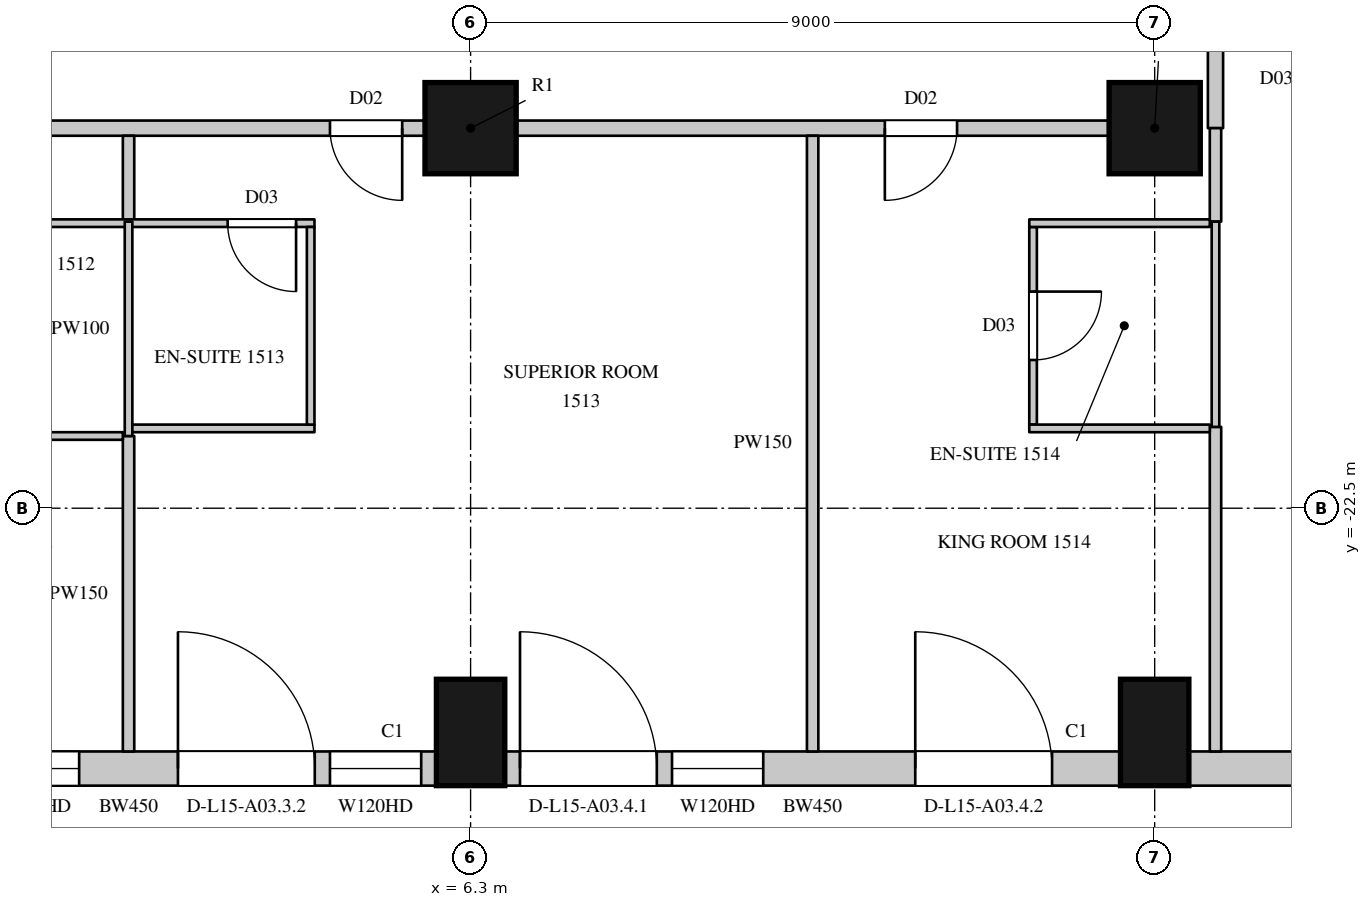
"""IFC4 building model, lengths in metres.
Left out: names, types, materials, properties, quantities, classifications, styles, units other than length and angle.
Written with IfcOpenShell. Run it as: python <this file> out.ifc"""

import sys

from ifc_helpers import new_model, si_unit, direction, frame, frame_2d, origin, origin_2d, place, context, subcontext, project, spatial, rectangle, circle, extrude, element, fill, save


model = new_model("IFC4")
c1 = context("Model", 3, precision=1e-05, world=origin(), true_north=direction((0.0, 1.0)))
c2 = subcontext(c1, "Body", "Model", "MODEL_VIEW")
j1 = project(units=[si_unit("LENGTHUNIT", "METRE"), si_unit("PLANEANGLEUNIT", "RADIAN")], contexts=[c1])
p1 = place(None, origin())
s1 = spatial("IfcSite", under=j1, at=p1, CompositionType="ELEMENT")
p2 = place(p1, origin())
s2 = spatial("IfcBuilding", under=s1, at=p2, CompositionType="ELEMENT")
p3 = place(p2, frame((0.0, 0.0, 84.3)))
s3 = spatial("IfcBuildingStorey", under=s2, at=p3, CompositionType="ELEMENT", Elevation=84.3)
for number, where, z_axis, x_axis in (
    (1, (6.3, -25.45, 0.0), (0.0, 0.0, 1.0), (1.0, 0.0, 0.0)),
    (2, (15.3, -25.45, 0.0), (0.0, 0.0, 1.0), (1.0, 0.0, 0.0)),
):
    element("IfcColumn", number, at=place(p3, frame(where, z_axis=z_axis, x_axis=x_axis)), inside=s3, PredefinedType="COLUMN", context=c2, shape_type="SweptSolid", body=[
        extrude(rectangle(XDim=0.9, YDim=1.4, at=origin_2d()), origin(), (0.0, 0.0, 1.0), 3.6),
    ])
for number, where, z_axis, x_axis in (
    (3, (6.3, -17.5, 0.0), (0.0, 0.0, 1.0), (1.0, 0.0, 0.0)),
    (4, (15.3, -17.5, 0.0), (0.0, 0.0, 1.0), (1.0, 0.0, 0.0)),
):
    element("IfcColumn", number, at=place(p3, frame(where, z_axis=z_axis, x_axis=x_axis)), inside=s3, PredefinedType="COLUMN", context=c2, shape_type="SweptSolid", body=[
        extrude(circle(Radius=0.6, at=origin_2d()), origin(), (0.0, 0.0, 1.0), 3.6),
    ])
p4 = place(p3, frame((-2.25, -25.925, 0.0), z_axis=(0.0, 0.0, 1.0), x_axis=(1.0, 0.0, 0.0)))
e5 = element("IfcWall", 5, at=p4, inside=s3, PredefinedType="SOLIDWALL", context=c2, shape_type="SweptSolid", body=[
    extrude(rectangle(XDim=8.1, YDim=0.45, at=frame_2d((4.05, 0.0))), origin(), (0.0, 0.0, 1.0), 3.3),
])
p5 = place(p4, frame((0.2, 0.0, 0.0)))
e6 = element("IfcOpeningElement", 6, at=p5, cuts=e5, PredefinedType="OPENING", context=c2, shape_type="SweptSolid", body=[
    extrude(rectangle(XDim=1.8, YDim=2.4, at=frame_2d((0.9, 1.2))), frame((0.0, 0.235, 0.0), z_axis=(0.0, -1.0, 0.0), x_axis=(1.0, 0.0, 0.0)), (0.0, 0.0, 1.0), 0.47),
])
p6 = place(p4, frame((2.2, 0.0, 1.05)))
e7 = element("IfcOpeningElement", 7, at=p6, cuts=e5, PredefinedType="OPENING", context=c2, shape_type="SweptSolid", body=[
    extrude(rectangle(XDim=1.2, YDim=2.0, at=frame_2d((0.6, 1.0))), frame((0.0, 0.235, 0.0), z_axis=(0.0, -1.0, 0.0), x_axis=(1.0, 0.0, 0.0)), (0.0, 0.0, 1.0), 0.47),
])
p7 = place(p4, frame((4.7, 0.0, 0.0)))
e8 = element("IfcOpeningElement", 8, at=p7, cuts=e5, PredefinedType="OPENING", context=c2, shape_type="SweptSolid", body=[
    extrude(rectangle(XDim=1.8, YDim=2.4, at=frame_2d((0.9, 1.2))), frame((0.0, 0.235, 0.0), z_axis=(0.0, -1.0, 0.0), x_axis=(1.0, 0.0, 0.0)), (0.0, 0.0, 1.0), 0.47),
])
p8 = place(p4, frame((6.7, 0.0, 1.05)))
e9 = element("IfcOpeningElement", 9, at=p8, cuts=e5, PredefinedType="OPENING", context=c2, shape_type="SweptSolid", body=[
    extrude(rectangle(XDim=1.2, YDim=2.0, at=frame_2d((0.6, 1.0))), frame((0.0, 0.235, 0.0), z_axis=(0.0, -1.0, 0.0), x_axis=(1.0, 0.0, 0.0)), (0.0, 0.0, 1.0), 0.47),
])
p9 = place(p3, frame((6.75, -25.925, 0.0), z_axis=(0.0, 0.0, 1.0), x_axis=(1.0, 0.0, 0.0)))
e10 = element("IfcWall", 10, at=p9, inside=s3, PredefinedType="SOLIDWALL", context=c2, shape_type="SweptSolid", body=[
    extrude(rectangle(XDim=8.1, YDim=0.45, at=frame_2d((4.05, 0.0))), origin(), (0.0, 0.0, 1.0), 3.3),
])
p10 = place(p9, frame((0.2, 0.0, 0.0)))
e11 = element("IfcOpeningElement", 11, at=p10, cuts=e10, PredefinedType="OPENING", context=c2, shape_type="SweptSolid", body=[
    extrude(rectangle(XDim=1.8, YDim=2.4, at=frame_2d((0.9, 1.2))), frame((0.0, 0.235, 0.0), z_axis=(0.0, -1.0, 0.0), x_axis=(1.0, 0.0, 0.0)), (0.0, 0.0, 1.0), 0.47),
])
p11 = place(p9, frame((2.2, 0.0, 1.05)))
e12 = element("IfcOpeningElement", 12, at=p11, cuts=e10, PredefinedType="OPENING", context=c2, shape_type="SweptSolid", body=[
    extrude(rectangle(XDim=1.2, YDim=2.0, at=frame_2d((0.6, 1.0))), frame((0.0, 0.235, 0.0), z_axis=(0.0, -1.0, 0.0), x_axis=(1.0, 0.0, 0.0)), (0.0, 0.0, 1.0), 0.47),
])
p12 = place(p9, frame((5.4, 0.0, 0.0)))
e13 = element("IfcOpeningElement", 13, at=p12, cuts=e10, PredefinedType="OPENING", context=c2, shape_type="SweptSolid", body=[
    extrude(rectangle(XDim=1.8, YDim=2.4, at=frame_2d((0.9, 1.2))), frame((0.0, 0.235, 0.0), z_axis=(0.0, -1.0, 0.0), x_axis=(1.0, 0.0, 0.0)), (0.0, 0.0, 1.0), 0.47),
])
p13 = place(p3, frame((15.75, -25.925, 0.0), z_axis=(0.0, 0.0, 1.0), x_axis=(1.0, 0.0, 0.0)))
e14 = element("IfcWall", 14, at=p13, inside=s3, PredefinedType="SOLIDWALL", context=c2, shape_type="SweptSolid", body=[
    extrude(rectangle(XDim=2.914, YDim=0.45, at=frame_2d((1.457, 0.0))), origin(), (0.0, 0.0, 1.0), 3.3),
])
p14 = place(p3, frame((-2.1, -17.5, 0.0), z_axis=(0.0, 0.0, 1.0), x_axis=(1.0, 0.0, 0.0)))
e15 = element("IfcWall", 15, at=p14, inside=s3, PredefinedType="PARTITIONING", context=c2, shape_type="SweptSolid", body=[
    extrude(rectangle(XDim=7.8, YDim=0.2, at=frame_2d((3.9, 0.0))), origin(), (0.0, 0.0, 1.0), 2.75),
])
p15 = place(p14, frame((6.55, 0.0, 0.0)))
e16 = element("IfcOpeningElement", 16, at=p15, cuts=e15, PredefinedType="OPENING", context=c2, shape_type="SweptSolid", body=[
    extrude(rectangle(XDim=0.95, YDim=2.2, at=frame_2d((0.475, 1.1))), frame((0.0, 0.11, 0.0), z_axis=(0.0, -1.0, 0.0), x_axis=(1.0, 0.0, 0.0)), (0.0, 0.0, 1.0), 0.22),
])
p16 = place(p3, frame((6.9, -17.5, 0.0), z_axis=(0.0, 0.0, 1.0), x_axis=(1.0, 0.0, 0.0)))
e17 = element("IfcWall", 17, at=p16, inside=s3, PredefinedType="PARTITIONING", context=c2, shape_type="SweptSolid", body=[
    extrude(rectangle(XDim=7.8, YDim=0.2, at=frame_2d((3.9, 0.0))), origin(), (0.0, 0.0, 1.0), 2.75),
])
p17 = place(p16, frame((4.85, 0.0, 0.0)))
e18 = element("IfcOpeningElement", 18, at=p17, cuts=e17, PredefinedType="OPENING", context=c2, shape_type="SweptSolid", body=[
    extrude(rectangle(XDim=0.95, YDim=2.2, at=frame_2d((0.475, 1.1))), frame((0.0, 0.11, 0.0), z_axis=(0.0, -1.0, 0.0), x_axis=(1.0, 0.0, 0.0)), (0.0, 0.0, 1.0), 0.22),
])
p18 = place(p3, frame((16.1, -17.5, 0.0), z_axis=(0.0, 0.0, 1.0), x_axis=(0.0, 1.0, 0.0)))
e19 = element("IfcWall", 19, at=p18, inside=s3, PredefinedType="PARTITIONING", context=c2, shape_type="SweptSolid", body=[
    extrude(rectangle(XDim=12.75, YDim=0.2, at=frame_2d((6.375, 0.0))), origin(), (0.0, 0.0, 1.0), 3.3),
])
p19 = place(p18, frame((2.75, 0.0, 0.0)))
e20 = element("IfcOpeningElement", 20, at=p19, cuts=e19, PredefinedType="OPENING", context=c2, shape_type="SweptSolid", body=[
    extrude(rectangle(XDim=0.95, YDim=2.2, at=frame_2d((0.475, 1.1))), frame((0.0, 0.11, 0.0), z_axis=(0.0, -1.0, 0.0), x_axis=(1.0, 0.0, 0.0)), (0.0, 0.0, 1.0), 0.22),
])
p20 = place(p18, frame((6.95, 0.0, 0.0)))
e21 = element("IfcOpeningElement", 21, at=p20, cuts=e19, PredefinedType="OPENING", context=c2, shape_type="SweptSolid", body=[
    extrude(rectangle(XDim=0.95, YDim=2.2, at=frame_2d((0.475, 1.1))), frame((0.0, 0.11, 0.0), z_axis=(0.0, -1.0, 0.0), x_axis=(1.0, 0.0, 0.0)), (0.0, 0.0, 1.0), 0.22),
])
p21 = place(p18, frame((11.4, 0.0, 0.0)))
e22 = element("IfcOpeningElement", 22, at=p21, cuts=e19, PredefinedType="OPENING", context=c2, shape_type="SweptSolid", body=[
    extrude(rectangle(XDim=0.95, YDim=2.2, at=frame_2d((0.475, 1.1))), frame((0.0, 0.11, 0.0), z_axis=(0.0, -1.0, 0.0), x_axis=(1.0, 0.0, 0.0)), (0.0, 0.0, 1.0), 0.22),
])
p22 = place(p3, frame((1.8, -25.7, 0.0), z_axis=(0.0, 0.0, 1.0), x_axis=(0.0, 1.0, 0.0)))
e23 = element("IfcWall", 23, at=p22, inside=s3, PredefinedType="PARTITIONING", context=c2, shape_type="SweptSolid", body=[
    extrude(rectangle(XDim=4.15, YDim=0.15, at=frame_2d((2.075, 0.0))), origin(), (0.0, 0.0, 1.0), 2.65),
])
p23 = place(p3, frame((1.8, -18.73, 0.0), z_axis=(0.0, 0.0, 1.0), x_axis=(0.0, 1.0, 0.0)))
e24 = element("IfcWall", 24, at=p23, inside=s3, PredefinedType="PARTITIONING", context=c2, shape_type="SweptSolid", body=[
    extrude(rectangle(XDim=1.13, YDim=0.15, at=frame_2d((0.565, 0.0))), origin(), (0.0, 0.0, 1.0), 2.65),
])
p24 = place(p3, frame((10.8, -25.7, 0.0), z_axis=(0.0, 0.0, 1.0), x_axis=(0.0, 1.0, 0.0)))
e25 = element("IfcWall", 25, at=p24, inside=s3, PredefinedType="PARTITIONING", context=c2, shape_type="SweptSolid", body=[
    extrude(rectangle(XDim=8.1, YDim=0.15, at=frame_2d((4.05, 0.0))), origin(), (0.0, 0.0, 1.0), 2.65),
])
p25 = place(p3, frame((16.1, -25.7, 0.0), z_axis=(0.0, 0.0, 1.0), x_axis=(0.0, 1.0, 0.0)))
e26 = element("IfcWall", 26, at=p25, inside=s3, PredefinedType="PARTITIONING", context=c2, shape_type="SweptSolid", body=[
    extrude(rectangle(XDim=4.27, YDim=0.15, at=frame_2d((2.135, 0.0))), origin(), (0.0, 0.0, 1.0), 3.3),
])
p26 = place(p3, frame((16.1, -18.73, 0.0), z_axis=(0.0, 0.0, 1.0), x_axis=(0.0, 1.0, 0.0)))
e27 = element("IfcWall", 27, at=p26, inside=s3, PredefinedType="PARTITIONING", context=c2, shape_type="SweptSolid", body=[
    extrude(rectangle(XDim=1.23, YDim=0.15, at=frame_2d((0.615, 0.0))), origin(), (0.0, 0.0, 1.0), 3.3),
])
p27 = place(p3, frame((-0.846, -21.55, 0.0), z_axis=(0.0, 0.0, 1.0), x_axis=(1.0, 0.0, 0.0)))
e28 = element("IfcWall", 28, at=p27, inside=s3, PredefinedType="PARTITIONING", context=c2, shape_type="SweptSolid", body=[
    extrude(rectangle(XDim=2.571, YDim=0.1, at=frame_2d((1.286, 0.0))), origin(), (0.0, 0.0, 1.0), 3.3),
])
p28 = place(p3, frame((-0.846, -18.75, 0.0), z_axis=(0.0, 0.0, 1.0), x_axis=(1.0, 0.0, 0.0)))
e29 = element("IfcWall", 29, at=p28, inside=s3, PredefinedType="PARTITIONING", context=c2, shape_type="SweptSolid", body=[
    extrude(rectangle(XDim=5.092, YDim=0.1, at=frame_2d((2.546, 0.0))), origin(), (0.0, 0.0, 1.0), 3.3),
])
p29 = place(p28, frame((3.95, 0.0, 0.0)))
e30 = element("IfcOpeningElement", 30, at=p29, cuts=e29, PredefinedType="OPENING", context=c2, shape_type="SweptSolid", body=[
    extrude(rectangle(XDim=0.9, YDim=2.2, at=frame_2d((0.45, 1.1))), frame((0.0, 0.06, 0.0), z_axis=(0.0, -1.0, 0.0), x_axis=(1.0, 0.0, 0.0)), (0.0, 0.0, 1.0), 0.12),
])
p30 = place(p3, frame((1.8, -21.55, 0.0), z_axis=(0.0, 0.0, 1.0), x_axis=(0.0, 1.0, 0.0)))
e31 = element("IfcWall", 31, at=p30, inside=s3, PredefinedType="PARTITIONING", context=c2, shape_type="SweptSolid", body=[
    extrude(rectangle(XDim=2.82, YDim=0.1, at=frame_2d((1.41, 0.0))), origin(), (0.0, 0.0, 1.0), 2.65),
])
p31 = place(p3, frame((1.85, -21.45, 0.0), z_axis=(0.0, 0.0, 1.0), x_axis=(1.0, 0.0, 0.0)))
e32 = element("IfcWall", 32, at=p31, inside=s3, PredefinedType="PARTITIONING", context=c2, shape_type="SweptSolid", body=[
    extrude(rectangle(XDim=2.396, YDim=0.1, at=frame_2d((1.198, 0.0))), origin(), (0.0, 0.0, 1.0), 3.3),
])
p32 = place(p3, frame((4.196, -21.4, 0.0), z_axis=(0.0, 0.0, 1.0), x_axis=(0.0, 1.0, 0.0)))
e33 = element("IfcWall", 33, at=p32, inside=s3, PredefinedType="PARTITIONING", context=c2, shape_type="SweptSolid", body=[
    extrude(rectangle(XDim=2.6, YDim=0.1, at=frame_2d((1.3, 0.0))), origin(), (0.0, 0.0, 1.0), 3.3),
])
p33 = place(p3, frame((13.7, -21.4, 0.0), z_axis=(0.0, 0.0, 1.0), x_axis=(0.0, 1.0, 0.0)))
e34 = element("IfcWall", 34, at=p33, inside=s3, PredefinedType="PARTITIONING", context=c2, shape_type="SweptSolid", body=[
    extrude(rectangle(XDim=2.6, YDim=0.1, at=frame_2d((1.3, 0.0))), origin(), (0.0, 0.0, 1.0), 3.3),
])
p34 = place(p33, frame((0.85, 0.0, 0.0)))
e35 = element("IfcOpeningElement", 35, at=p34, cuts=e34, PredefinedType="OPENING", context=c2, shape_type="SweptSolid", body=[
    extrude(rectangle(XDim=0.9, YDim=2.2, at=frame_2d((0.45, 1.1))), frame((0.0, 0.06, 0.0), z_axis=(0.0, -1.0, 0.0), x_axis=(1.0, 0.0, 0.0)), (0.0, 0.0, 1.0), 0.12),
])
for number, where, z_axis, x_axis in (
    (36, (13.65, -21.45, 0.0), (0.0, 0.0, 1.0), (1.0, 0.0, 0.0)),
    (37, (13.65, -18.75, 0.0), (0.0, 0.0, 1.0), (1.0, 0.0, 0.0)),
):
    element("IfcWall", number, at=place(p3, frame(where, z_axis=z_axis, x_axis=x_axis)), inside=s3, PredefinedType="PARTITIONING", context=c2, shape_type="SweptSolid", body=[
        extrude(rectangle(XDim=2.375, YDim=0.1, at=frame_2d((1.188, 0.0))), origin(), (0.0, 0.0, 1.0), 3.3),
    ])
p35 = place(p3, frame((16.1, -21.43, 0.0), z_axis=(0.0, 0.0, 1.0), x_axis=(0.0, 1.0, 0.0)))
e38 = element("IfcWall", 38, at=p35, inside=s3, PredefinedType="PARTITIONING", context=c2, shape_type="SweptSolid", body=[
    extrude(rectangle(XDim=2.7, YDim=0.1, at=frame_2d((1.35, 0.0))), origin(), (0.0, 0.0, 1.0), 3.3),
])
p36 = place(p6, origin())
e39 = element("IfcWindow", 39, at=p36, inside=s3, PartitioningType="SINGLE_PANEL", PredefinedType="WINDOW", context=c2, shape_type="SweptSolid", body=[
    extrude(rectangle(XDim=1.2, YDim=2.0, at=frame_2d((0.6, 1.0))), frame((0.0, 0.135, 0.0), z_axis=(0.0, -1.0, 0.0), x_axis=(1.0, 0.0, 0.0)), (0.0, 0.0, 1.0), 0.06),
])
fill(e7, e39)
p37 = place(p7, origin())
e40 = element("IfcDoor", 40, at=p37, inside=s3, OperationType="SLIDING_TO_LEFT", PredefinedType="DOOR", context=c2, shape_type="SweptSolid", body=[
    extrude(rectangle(XDim=1.8, YDim=2.4, at=frame_2d((0.9, 1.2))), frame((0.0, 0.13, 0.0), z_axis=(0.0, -1.0, 0.0), x_axis=(1.0, 0.0, 0.0)), (0.0, 0.0, 1.0), 0.05),
])
fill(e8, e40)
p38 = place(p8, origin())
e41 = element("IfcWindow", 41, at=p38, inside=s3, PartitioningType="SINGLE_PANEL", PredefinedType="WINDOW", context=c2, shape_type="SweptSolid", body=[
    extrude(rectangle(XDim=1.2, YDim=2.0, at=frame_2d((0.6, 1.0))), frame((0.0, 0.135, 0.0), z_axis=(0.0, -1.0, 0.0), x_axis=(1.0, 0.0, 0.0)), (0.0, 0.0, 1.0), 0.06),
])
fill(e9, e41)
p39 = place(p10, origin())
e42 = element("IfcDoor", 42, at=p39, inside=s3, OperationType="SLIDING_TO_LEFT", PredefinedType="DOOR", context=c2, shape_type="SweptSolid", body=[
    extrude(rectangle(XDim=1.8, YDim=2.4, at=frame_2d((0.9, 1.2))), frame((0.0, 0.13, 0.0), z_axis=(0.0, -1.0, 0.0), x_axis=(1.0, 0.0, 0.0)), (0.0, 0.0, 1.0), 0.05),
])
fill(e11, e42)
p40 = place(p11, origin())
e43 = element("IfcWindow", 43, at=p40, inside=s3, PartitioningType="SINGLE_PANEL", PredefinedType="WINDOW", context=c2, shape_type="SweptSolid", body=[
    extrude(rectangle(XDim=1.2, YDim=2.0, at=frame_2d((0.6, 1.0))), frame((0.0, 0.135, 0.0), z_axis=(0.0, -1.0, 0.0), x_axis=(1.0, 0.0, 0.0)), (0.0, 0.0, 1.0), 0.06),
])
fill(e12, e43)
p41 = place(p12, origin())
e44 = element("IfcDoor", 44, at=p41, inside=s3, OperationType="SLIDING_TO_LEFT", PredefinedType="DOOR", context=c2, shape_type="SweptSolid", body=[
    extrude(rectangle(XDim=1.8, YDim=2.4, at=frame_2d((0.9, 1.2))), frame((0.0, 0.13, 0.0), z_axis=(0.0, -1.0, 0.0), x_axis=(1.0, 0.0, 0.0)), (0.0, 0.0, 1.0), 0.05),
])
fill(e13, e44)
p42 = place(p15, origin())
e45 = element("IfcDoor", 45, at=p42, inside=s3, OperationType="SINGLE_SWING_LEFT", PredefinedType="DOOR", context=c2, shape_type="SweptSolid", body=[
    extrude(rectangle(XDim=0.95, YDim=2.2, at=frame_2d((0.475, 1.1))), frame((0.0, 0.025, 0.0), z_axis=(0.0, -1.0, 0.0), x_axis=(1.0, 0.0, 0.0)), (0.0, 0.0, 1.0), 0.05),
])
fill(e16, e45)
p43 = place(p29, origin())
e46 = element("IfcDoor", 46, at=p43, inside=s3, OperationType="SINGLE_SWING_LEFT", PredefinedType="DOOR", context=c2, shape_type="SweptSolid", body=[
    extrude(rectangle(XDim=0.9, YDim=2.2, at=frame_2d((0.45, 1.1))), frame((0.0, 0.025, 0.0), z_axis=(0.0, -1.0, 0.0), x_axis=(1.0, 0.0, 0.0)), (0.0, 0.0, 1.0), 0.05),
])
fill(e30, e46)
p44 = place(p17, origin())
e47 = element("IfcDoor", 47, at=p44, inside=s3, OperationType="SINGLE_SWING_RIGHT", PredefinedType="DOOR", context=c2, shape_type="SweptSolid", body=[
    extrude(rectangle(XDim=0.95, YDim=2.2, at=frame_2d((0.475, 1.1))), frame((0.0, 0.025, 0.0), z_axis=(0.0, -1.0, 0.0), x_axis=(1.0, 0.0, 0.0)), (0.0, 0.0, 1.0), 0.05),
])
fill(e18, e47)
p45 = place(p34, origin())
e48 = element("IfcDoor", 48, at=p45, inside=s3, OperationType="SINGLE_SWING_LEFT", PredefinedType="DOOR", context=c2, shape_type="SweptSolid", body=[
    extrude(rectangle(XDim=0.9, YDim=2.2, at=frame_2d((0.45, 1.1))), frame((0.0, 0.025, 0.0), z_axis=(0.0, -1.0, 0.0), x_axis=(1.0, 0.0, 0.0)), (0.0, 0.0, 1.0), 0.05),
])
fill(e35, e48)
save(model, sys.argv[1])
